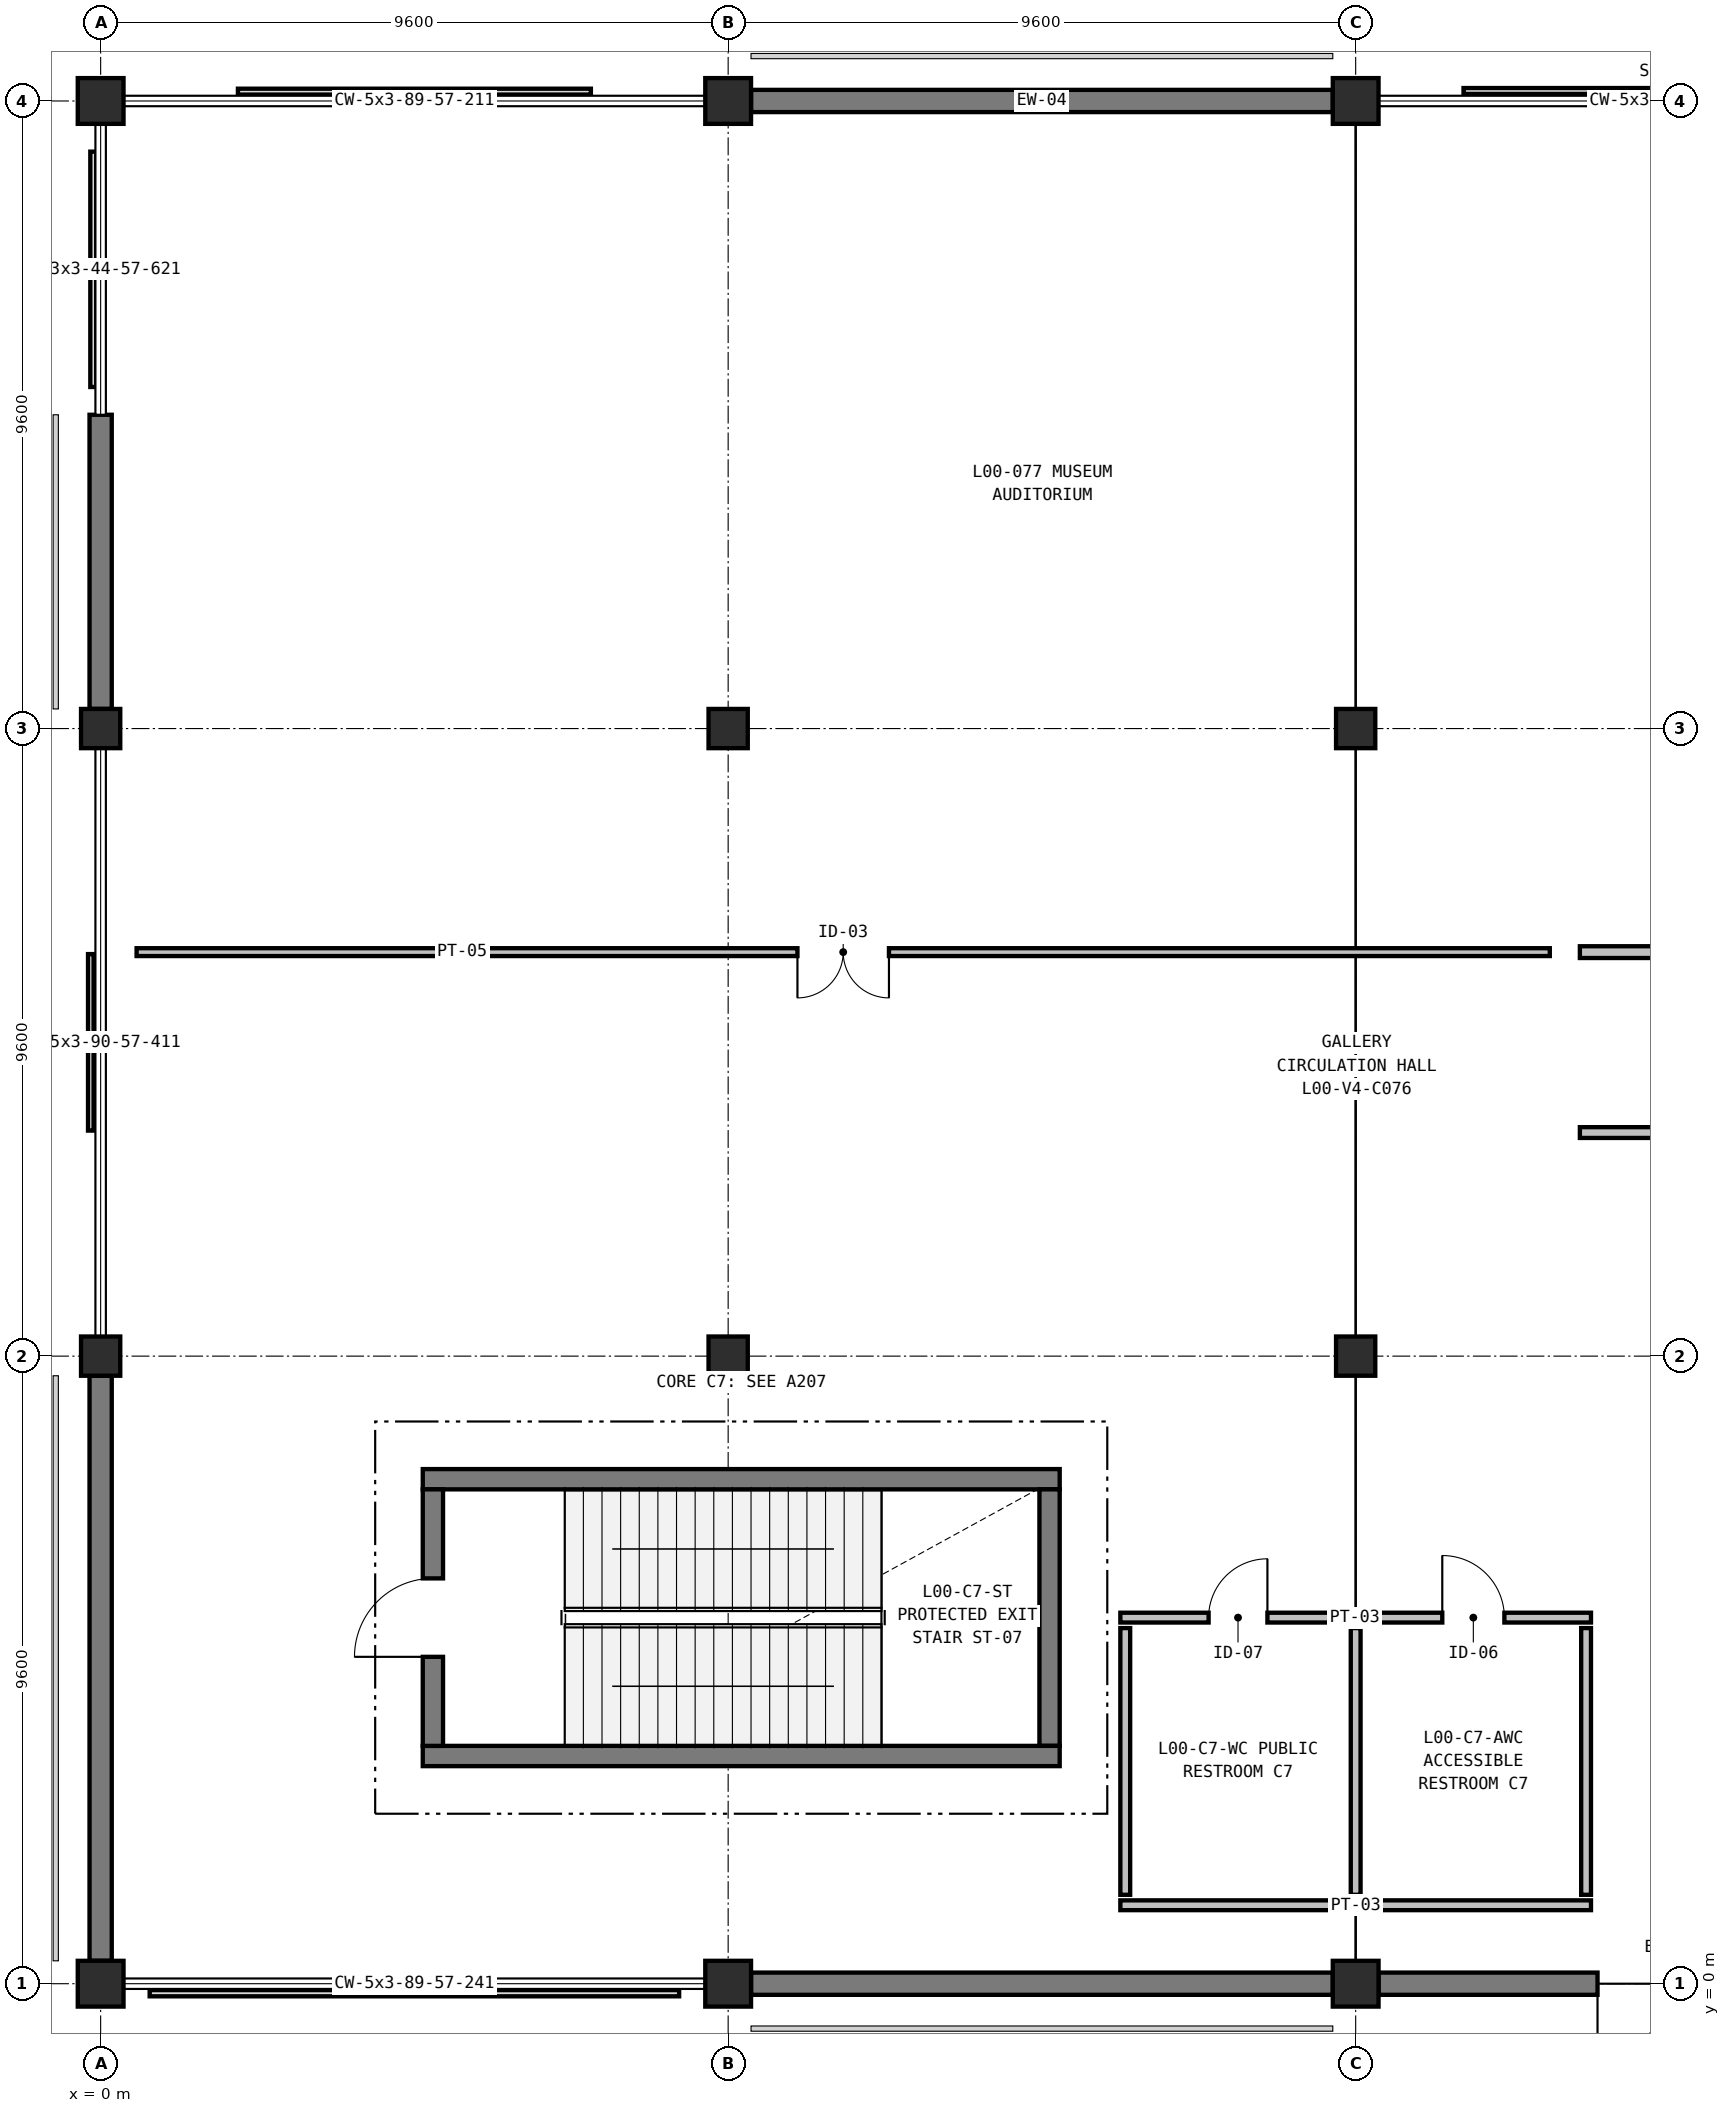
"""IFC4 building model, lengths in metres.
Left out: names, types, materials, properties, quantities, classifications, styles, units other than length and angle.
Written with IfcOpenShell. Run it as: python <this file> out.ifc"""

import sys

from ifc_helpers import new_model, si_unit, direction, frame, frame_2d, origin, origin_with_axes, origin_2d, place, context, subcontext, project, spatial, rectangle, extrude, element, fill, save


model = new_model("IFC4")
c1 = context("Model", 3, precision=1e-05, world=origin(), true_north=direction((0.0, 1.0)))
c2 = subcontext(c1, "Body", "Model", "MODEL_VIEW")
j1 = project(units=[si_unit("LENGTHUNIT", "METRE"), si_unit("PLANEANGLEUNIT", "RADIAN")], contexts=[c1])
p1 = place(None, origin())
s1 = spatial("IfcSite", under=j1, at=p1, CompositionType="ELEMENT")
p2 = place(p1, origin())
s2 = spatial("IfcBuilding", under=s1, at=p2, CompositionType="ELEMENT")
p3 = place(p2, origin())
s3 = spatial("IfcBuildingStorey", under=s2, at=p3, CompositionType="ELEMENT", Elevation=0.0)
p4 = place(p3, origin_with_axes())
e1 = element("IfcColumn", 1, at=p4, inside=s3, PredefinedType="COLUMN", context=c2, shape_type="SweptSolid", body=[
    extrude(rectangle(XDim=0.7, YDim=0.7, at=origin_2d()), origin(), (0.0, 0.0, 1.0), 6.0),
])
for number, where, z_axis, x_axis in (
    (2, (0.0, 9.6, 0.0), (0.0, 0.0, 1.0), (1.0, 0.0, 0.0)),
    (3, (0.0, 19.2, 0.0), (0.0, 0.0, 1.0), (1.0, 0.0, 0.0)),
):
    element("IfcColumn", number, at=place(p3, frame(where, z_axis=z_axis, x_axis=x_axis)), inside=s3, PredefinedType="COLUMN", context=c2, shape_type="SweptSolid", body=[
        extrude(rectangle(XDim=0.6, YDim=0.6, at=origin_2d()), origin(), (0.0, 0.0, 1.0), 6.0),
    ])
for number, where, z_axis, x_axis in (
    (4, (0.0, 28.8, 0.0), (0.0, 0.0, 1.0), (1.0, 0.0, 0.0)),
    (5, (9.6, 0.0, 0.0), (0.0, 0.0, 1.0), (1.0, 0.0, 0.0)),
):
    element("IfcColumn", number, at=place(p3, frame(where, z_axis=z_axis, x_axis=x_axis)), inside=s3, PredefinedType="COLUMN", context=c2, shape_type="SweptSolid", body=[
        extrude(rectangle(XDim=0.7, YDim=0.7, at=origin_2d()), origin(), (0.0, 0.0, 1.0), 6.0),
    ])
for number, where, z_axis, x_axis in (
    (6, (9.6, 9.6, 0.0), (0.0, 0.0, 1.0), (1.0, 0.0, 0.0)),
    (7, (9.6, 19.2, 0.0), (0.0, 0.0, 1.0), (1.0, 0.0, 0.0)),
):
    element("IfcColumn", number, at=place(p3, frame(where, z_axis=z_axis, x_axis=x_axis)), inside=s3, PredefinedType="COLUMN", context=c2, shape_type="SweptSolid", body=[
        extrude(rectangle(XDim=0.6, YDim=0.6, at=origin_2d()), origin(), (0.0, 0.0, 1.0), 6.0),
    ])
for number, where, z_axis, x_axis in (
    (8, (9.6, 28.8, 0.0), (0.0, 0.0, 1.0), (1.0, 0.0, 0.0)),
    (9, (19.2, 0.0, 0.0), (0.0, 0.0, 1.0), (1.0, 0.0, 0.0)),
):
    element("IfcColumn", number, at=place(p3, frame(where, z_axis=z_axis, x_axis=x_axis)), inside=s3, PredefinedType="COLUMN", context=c2, shape_type="SweptSolid", body=[
        extrude(rectangle(XDim=0.7, YDim=0.7, at=origin_2d()), origin(), (0.0, 0.0, 1.0), 6.0),
    ])
for number, where, z_axis, x_axis in (
    (10, (19.2, 9.6, 0.0), (0.0, 0.0, 1.0), (1.0, 0.0, 0.0)),
    (11, (19.2, 19.2, 0.0), (0.0, 0.0, 1.0), (1.0, 0.0, 0.0)),
):
    element("IfcColumn", number, at=place(p3, frame(where, z_axis=z_axis, x_axis=x_axis)), inside=s3, PredefinedType="COLUMN", context=c2, shape_type="SweptSolid", body=[
        extrude(rectangle(XDim=0.6, YDim=0.6, at=origin_2d()), origin(), (0.0, 0.0, 1.0), 6.0),
    ])
p5 = place(p3, frame((19.2, 28.8, 0.0), z_axis=(0.0, 0.0, 1.0), x_axis=(1.0, 0.0, 0.0)))
e12 = element("IfcColumn", 12, at=p5, inside=s3, PredefinedType="COLUMN", context=c2, shape_type="SweptSolid", body=[
    extrude(rectangle(XDim=0.7, YDim=0.7, at=origin_2d()), origin(), (0.0, 0.0, 1.0), 6.0),
])
p6 = place(p3, frame((9.95, 28.8, 0.0), z_axis=(0.0, 0.0, 1.0), x_axis=(1.0, 0.0, 0.0)))
e13 = element("IfcWall", 13, at=p6, inside=s3, PredefinedType="SOLIDWALL", context=c2, shape_type="SweptSolid", body=[
    extrude(rectangle(XDim=8.9, YDim=0.34, at=frame_2d((4.45, 0.0))), origin(), (0.0, 0.0, 1.0), 5.68),
])
p7 = place(p3, frame((28.45, 0.0, 0.0), z_axis=(0.0, 0.0, 1.0), x_axis=(-1.0, 0.0, 0.0)))
e14 = element("IfcWall", 14, at=p7, inside=s3, PredefinedType="SOLIDWALL", context=c2, shape_type="SweptSolid", body=[
    extrude(rectangle(XDim=8.9, YDim=0.34, at=frame_2d((4.45, 0.0))), origin(), (0.0, 0.0, 1.0), 5.68),
])
p8 = place(p7, frame((3.35, 0.0, 0.0)))
e15 = element("IfcOpeningElement", 15, at=p8, cuts=e14, PredefinedType="OPENING", context=c2, shape_type="SweptSolid", body=[
    extrude(rectangle(XDim=2.2, YDim=2.4, at=frame_2d((1.1, 1.2))), frame((0.0, 0.18, 0.0), z_axis=(0.0, -1.0, 0.0), x_axis=(1.0, 0.0, 0.0)), (0.0, 0.0, 1.0), 0.36),
])
p9 = place(p3, frame((18.85, 0.0, 0.0), z_axis=(0.0, 0.0, 1.0), x_axis=(-1.0, 0.0, 0.0)))
e16 = element("IfcWall", 16, at=p9, inside=s3, PredefinedType="SOLIDWALL", context=c2, shape_type="SweptSolid", body=[
    extrude(rectangle(XDim=8.9, YDim=0.34, at=frame_2d((4.45, 0.0))), origin(), (0.0, 0.0, 1.0), 5.68),
])
p10 = place(p3, frame((0.0, 0.35, 0.0), z_axis=(0.0, 0.0, 1.0), x_axis=(0.0, 1.0, 0.0)))
e17 = element("IfcWall", 17, at=p10, inside=s3, PredefinedType="SOLIDWALL", context=c2, shape_type="SweptSolid", body=[
    extrude(rectangle(XDim=8.95, YDim=0.34, at=frame_2d((4.475, 0.0))), origin(), (0.0, 0.0, 1.0), 5.68),
])
p11 = place(p3, frame((0.0, 19.5, 0.0), z_axis=(0.0, 0.0, 1.0), x_axis=(0.0, 1.0, 0.0)))
e18 = element("IfcWall", 18, at=p11, inside=s3, PredefinedType="SOLIDWALL", context=c2, shape_type="SweptSolid", body=[
    extrude(rectangle(XDim=4.5, YDim=0.34, at=frame_2d((2.25, 0.0))), origin(), (0.0, 0.0, 1.0), 5.68),
])
p12 = place(p3, frame((4.928, 7.717, 0.0), z_axis=(0.0, 0.0, 1.0), x_axis=(1.0, 0.0, 0.0)))
e19 = element("IfcWall", 19, at=p12, inside=s3, PredefinedType="SHEAR", context=c2, shape_type="SweptSolid", body=[
    extrude(rectangle(XDim=9.744, YDim=0.31, at=frame_2d((4.872, 0.0))), origin(), (0.0, 0.0, 1.0), 5.68),
])
p13 = place(p3, frame((14.517, 7.562, 0.0), z_axis=(0.0, 0.0, 1.0), x_axis=(0.0, -1.0, 0.0)))
e20 = element("IfcWall", 20, at=p13, inside=s3, PredefinedType="SHEAR", context=c2, shape_type="SweptSolid", body=[
    extrude(rectangle(XDim=3.924, YDim=0.31, at=frame_2d((1.962, 0.0))), origin(), (0.0, 0.0, 1.0), 5.68),
])
p14 = place(p3, frame((14.672, 3.483, 0.0), z_axis=(0.0, 0.0, 1.0), x_axis=(-1.0, 0.0, 0.0)))
e21 = element("IfcWall", 21, at=p14, inside=s3, PredefinedType="SHEAR", context=c2, shape_type="SweptSolid", body=[
    extrude(rectangle(XDim=9.744, YDim=0.31, at=frame_2d((4.872, 0.0))), origin(), (0.0, 0.0, 1.0), 5.68),
])
p15 = place(p3, frame((5.083, 3.638, 0.0), z_axis=(0.0, 0.0, 1.0), x_axis=(0.0, 1.0, 0.0)))
e22 = element("IfcWall", 22, at=p15, inside=s3, PredefinedType="SHEAR", context=c2, shape_type="SweptSolid", body=[
    extrude(rectangle(XDim=3.924, YDim=0.31, at=frame_2d((1.962, 0.0))), origin(), (0.0, 0.0, 1.0), 5.68),
])
p16 = place(p15, frame((1.362, 0.0, 0.0)))
e23 = element("IfcOpeningElement", 23, at=p16, cuts=e22, PredefinedType="OPENING", context=c2, shape_type="SweptSolid", body=[
    extrude(rectangle(XDim=1.2, YDim=2.2, at=frame_2d((0.6, 1.1))), frame((0.0, 0.165, 0.0), z_axis=(0.0, -1.0, 0.0), x_axis=(1.0, 0.0, 0.0)), (0.0, 0.0, 1.0), 0.33),
])
p17 = place(p3, frame((15.6, 5.6, 0.0), z_axis=(0.0, 0.0, 1.0), x_axis=(1.0, 0.0, 0.0)))
e24 = element("IfcWall", 24, at=p17, inside=s3, PredefinedType="PARTITIONING", context=c2, shape_type="SweptSolid", body=[
    extrude(rectangle(XDim=7.2, YDim=0.15, at=frame_2d((3.6, 0.0))), origin(), (0.0, 0.0, 1.0), 4.855),
])
p18 = place(p17, frame((1.35, 0.0, 0.0)))
e25 = element("IfcOpeningElement", 25, at=p18, cuts=e24, PredefinedType="OPENING", context=c2, shape_type="SweptSolid", body=[
    extrude(rectangle(XDim=0.9, YDim=2.1, at=frame_2d((0.45, 1.05))), frame((0.0, 0.085, 0.0), z_axis=(0.0, -1.0, 0.0), x_axis=(1.0, 0.0, 0.0)), (0.0, 0.0, 1.0), 0.17),
])
p19 = place(p17, frame((4.925, 0.0, 0.0)))
e26 = element("IfcOpeningElement", 26, at=p19, cuts=e24, PredefinedType="OPENING", context=c2, shape_type="SweptSolid", body=[
    extrude(rectangle(XDim=0.95, YDim=2.15, at=frame_2d((0.475, 1.075))), frame((0.0, 0.085, 0.0), z_axis=(0.0, -1.0, 0.0), x_axis=(1.0, 0.0, 0.0)), (0.0, 0.0, 1.0), 0.17),
])
p20 = place(p3, frame((15.6, 1.2, 0.0), z_axis=(0.0, 0.0, 1.0), x_axis=(1.0, 0.0, 0.0)))
e27 = element("IfcWall", 27, at=p20, inside=s3, PredefinedType="PARTITIONING", context=c2, shape_type="SweptSolid", body=[
    extrude(rectangle(XDim=7.2, YDim=0.15, at=frame_2d((3.6, 0.0))), origin(), (0.0, 0.0, 1.0), 4.855),
])
p21 = place(p3, frame((15.675, 1.36, 0.0), z_axis=(0.0, 0.0, 1.0), x_axis=(0.0, 1.0, 0.0)))
e28 = element("IfcWall", 28, at=p21, inside=s3, PredefinedType="PARTITIONING", context=c2, shape_type="SweptSolid", body=[
    extrude(rectangle(XDim=4.08, YDim=0.15, at=frame_2d((2.04, 0.0))), origin(), (0.0, 0.0, 1.0), 5.68),
])
p22 = place(p3, frame((19.2, 1.36, 0.0), z_axis=(0.0, 0.0, 1.0), x_axis=(0.0, 1.0, 0.0)))
e29 = element("IfcWall", 29, at=p22, inside=s3, PredefinedType="PARTITIONING", context=c2, shape_type="SweptSolid", body=[
    extrude(rectangle(XDim=4.08, YDim=0.15, at=frame_2d((2.04, 0.0))), origin(), (0.0, 0.0, 1.0), 4.855),
])
p23 = place(p3, frame((22.725, 1.36, 0.0), z_axis=(0.0, 0.0, 1.0), x_axis=(0.0, 1.0, 0.0)))
e30 = element("IfcWall", 30, at=p23, inside=s3, PredefinedType="PARTITIONING", context=c2, shape_type="SweptSolid", body=[
    extrude(rectangle(XDim=4.08, YDim=0.15, at=frame_2d((2.04, 0.0))), origin(), (0.0, 0.0, 1.0), 5.055),
])
p24 = place(p3, frame((22.17, 15.78, 0.0), z_axis=(0.0, 0.0, 1.0), x_axis=(-1.0, 0.0, 0.0)))
e31 = element("IfcWall", 31, at=p24, inside=s3, PredefinedType="PARTITIONING", context=c2, shape_type="SweptSolid", body=[
    extrude(rectangle(XDim=21.62, YDim=0.12, at=frame_2d((10.81, 0.0))), origin(), (0.0, 0.0, 1.0), 4.855),
])
p25 = place(p24, frame((10.11, 0.0, 0.0)))
e32 = element("IfcOpeningElement", 32, at=p25, cuts=e31, PredefinedType="OPENING", context=c2, shape_type="SweptSolid", body=[
    extrude(rectangle(XDim=1.4, YDim=2.3, at=frame_2d((0.7, 1.15))), frame((0.0, 0.07, 0.0), z_axis=(0.0, -1.0, 0.0), x_axis=(1.0, 0.0, 0.0)), (0.0, 0.0, 1.0), 0.14),
])
p26 = place(p3, frame((44.57, 15.78, 0.0), z_axis=(0.0, 0.0, 1.0), x_axis=(-1.0, 0.0, 0.0)))
e33 = element("IfcWall", 33, at=p26, inside=s3, PredefinedType="PARTITIONING", context=c2, shape_type="SweptSolid", body=[
    extrude(rectangle(XDim=21.94, YDim=0.18, at=frame_2d((10.97, 0.0))), origin(), (0.0, 0.0, 1.0), 4.855),
])
p27 = place(p26, frame((10.445, 0.0, 0.0)))
e34 = element("IfcOpeningElement", 34, at=p27, cuts=e33, PredefinedType="OPENING", context=c2, shape_type="SweptSolid", body=[
    extrude(rectangle(XDim=1.05, YDim=2.2, at=frame_2d((0.525, 1.1))), frame((0.0, 0.1, 0.0), z_axis=(0.0, -1.0, 0.0), x_axis=(1.0, 0.0, 0.0)), (0.0, 0.0, 1.0), 0.2),
])
p28 = place(p3, frame((22.63, 13.02, 0.0), z_axis=(0.0, 0.0, 1.0), x_axis=(1.0, 0.0, 0.0)))
e35 = element("IfcWall", 35, at=p28, inside=s3, PredefinedType="PARTITIONING", context=c2, shape_type="SweptSolid", body=[
    extrude(rectangle(XDim=21.94, YDim=0.165, at=frame_2d((10.97, 0.0))), origin(), (0.0, 0.0, 1.0), 4.855),
])
p29 = place(p28, frame((10.47, 0.0, 0.0)))
e36 = element("IfcOpeningElement", 36, at=p29, cuts=e35, PredefinedType="OPENING", context=c2, shape_type="SweptSolid", body=[
    extrude(rectangle(XDim=1.0, YDim=2.15, at=frame_2d((0.5, 1.075))), frame((0.0, 0.093, 0.0), z_axis=(0.0, -1.0, 0.0), x_axis=(1.0, 0.0, 0.0)), (0.0, 0.0, 1.0), 0.185),
])
p30 = place(p8, origin())
e37 = element("IfcDoor", 37, at=p30, inside=s3, OperationType="DOUBLE_DOOR_SINGLE_SWING", PredefinedType="DOOR", context=c2, shape_type="SweptSolid", body=[
    extrude(rectangle(XDim=2.2, YDim=2.4, at=frame_2d((1.1, 1.2))), frame((0.0, 0.025, 0.0), z_axis=(0.0, -1.0, 0.0), x_axis=(1.0, 0.0, 0.0)), (0.0, 0.0, 1.0), 0.05),
])
fill(e15, e37)
p31 = place(p16, origin())
e38 = element("IfcDoor", 38, at=p31, inside=s3, OperationType="SINGLE_SWING_LEFT", PredefinedType="DOOR", context=c2, shape_type="SweptSolid", body=[
    extrude(rectangle(XDim=1.2, YDim=2.2, at=frame_2d((0.6, 1.1))), frame((0.0, 0.025, 0.0), z_axis=(0.0, -1.0, 0.0), x_axis=(1.0, 0.0, 0.0)), (0.0, 0.0, 1.0), 0.05),
])
fill(e23, e38)
p32 = place(p18, origin())
e39 = element("IfcDoor", 39, at=p32, inside=s3, OperationType="SINGLE_SWING_RIGHT", PredefinedType="DOOR", context=c2, shape_type="SweptSolid", body=[
    extrude(rectangle(XDim=0.9, YDim=2.1, at=frame_2d((0.45, 1.05))), frame((0.0, 0.025, 0.0), z_axis=(0.0, -1.0, 0.0), x_axis=(1.0, 0.0, 0.0)), (0.0, 0.0, 1.0), 0.05),
])
fill(e25, e39)
p33 = place(p19, origin())
e40 = element("IfcDoor", 40, at=p33, inside=s3, OperationType="SINGLE_SWING_LEFT", PredefinedType="DOOR", context=c2, shape_type="SweptSolid", body=[
    extrude(rectangle(XDim=0.95, YDim=2.15, at=frame_2d((0.475, 1.075))), frame((0.0, 0.025, 0.0), z_axis=(0.0, -1.0, 0.0), x_axis=(1.0, 0.0, 0.0)), (0.0, 0.0, 1.0), 0.05),
])
fill(e26, e40)
p34 = place(p25, origin())
e41 = element("IfcDoor", 41, at=p34, inside=s3, OperationType="DOUBLE_DOOR_SINGLE_SWING", PredefinedType="DOOR", context=c2, shape_type="SweptSolid", body=[
    extrude(rectangle(XDim=1.4, YDim=2.3, at=frame_2d((0.7, 1.15))), frame((0.0, 0.025, 0.0), z_axis=(0.0, -1.0, 0.0), x_axis=(1.0, 0.0, 0.0)), (0.0, 0.0, 1.0), 0.05),
])
fill(e32, e41)
save(model, sys.argv[1])
